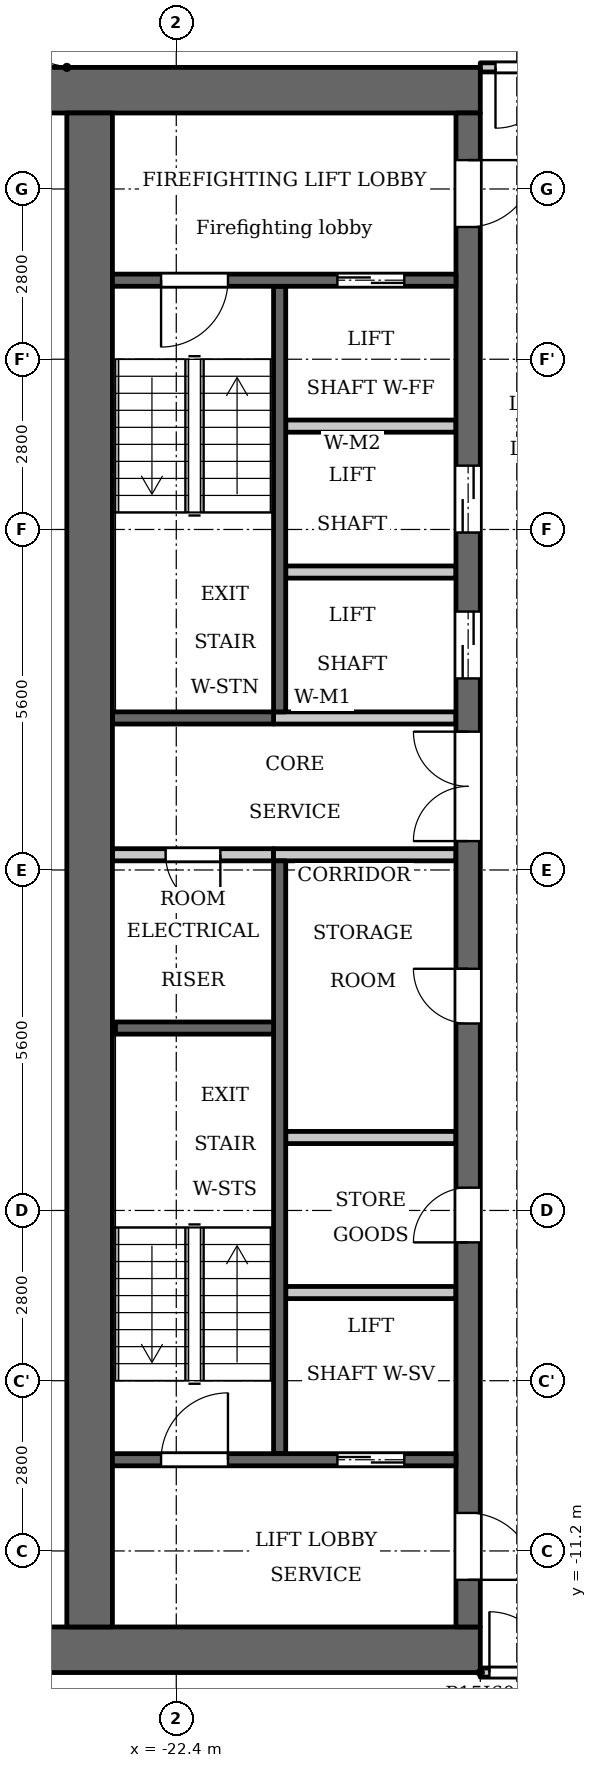
"""IFC4 building model, lengths in metres.
Left out: names, types, materials, properties, quantities, classifications, styles, units other than length and angle.
Written with IfcOpenShell. Run it as: python <this file> out.ifc"""

import sys

from ifc_helpers import new_model, si_unit, direction, frame, frame_2d, origin, place, context, subcontext, project, spatial, rectangle, extrude, element, fill, save


model = new_model("IFC4")
c1 = context("Model", 3, precision=1e-05, world=origin(), true_north=direction((0.0, 1.0)))
c2 = subcontext(c1, "Body", "Model", "MODEL_VIEW")
j1 = project(units=[si_unit("LENGTHUNIT", "METRE"), si_unit("PLANEANGLEUNIT", "RADIAN")], contexts=[c1])
p1 = place(None, origin())
s1 = spatial("IfcSite", under=j1, at=p1, CompositionType="ELEMENT")
p2 = place(p1, origin())
s2 = spatial("IfcBuilding", under=s1, at=p2, CompositionType="ELEMENT")
p3 = place(p2, frame((0.0, 0.0, 192.4)))
s3 = spatial("IfcBuildingStorey", under=s2, at=p3, CompositionType="ELEMENT", Elevation=192.4)
p4 = place(p3, frame((-20.7, 2.6, 0.0), z_axis=(0.0, 0.0, 1.0), x_axis=(0.0, 1.0, 0.0)))
e1 = element("IfcWall", 1, at=p4, inside=s3, PredefinedType="SHEAR", context=c2, shape_type="SweptSolid", body=[
    extrude(rectangle(XDim=7.0, YDim=0.2, at=frame_2d((3.5, 0.0))), origin(), (0.0, 0.0, 1.0), 3.2),
])
p5 = place(p3, frame((-20.7, -9.6, 0.0), z_axis=(0.0, 0.0, 1.0), x_axis=(0.0, 1.0, 0.0)))
e2 = element("IfcWall", 2, at=p5, inside=s3, PredefinedType="SHEAR", context=c2, shape_type="SweptSolid", body=[
    extrude(rectangle(XDim=9.75, YDim=0.2, at=frame_2d((4.875, 0.0))), origin(), (0.0, 0.0, 1.0), 3.2),
])
p6 = place(p3, frame((-20.8, 2.5, 0.0), z_axis=(0.0, 0.0, 1.0), x_axis=(-1.0, 0.0, 0.0)))
e3 = element("IfcWall", 3, at=p6, inside=s3, PredefinedType="SHEAR", context=c2, shape_type="SweptSolid", body=[
    extrude(rectangle(XDim=2.65, YDim=0.2, at=frame_2d((1.325, 0.0))), origin(), (0.0, 0.0, 1.0), 3.2),
])
p7 = place(p3, frame((-20.8, 0.25, 0.0), z_axis=(0.0, 0.0, 1.0), x_axis=(-1.0, 0.0, 0.0)))
e4 = element("IfcWall", 4, at=p7, inside=s3, PredefinedType="PARTITIONING", context=c2, shape_type="SweptSolid", body=[
    extrude(rectangle(XDim=2.65, YDim=0.2, at=frame_2d((1.325, 0.0))), origin(), (0.0, 0.0, 1.0), 3.2),
])
p8 = place(p7, frame((0.875, 0.0, 0.0)))
e5 = element("IfcOpeningElement", 5, at=p8, cuts=e4, PredefinedType="OPENING", context=c2, shape_type="SweptSolid", body=[
    extrude(rectangle(XDim=0.9, YDim=2.1, at=frame_2d((0.45, 1.05))), frame((0.0, 0.11, 0.0), z_axis=(0.0, -1.0, 0.0), x_axis=(1.0, 0.0, 0.0)), (0.0, 0.0, 1.0), 0.22),
])
for number, where, z_axis, x_axis in (
    (6, (-17.4, 12.825, 0.0), (0.0, 0.0, 1.0), (-1.0, 0.0, 0.0)),
    (7, (-17.4, -12.825, 0.0), (0.0, 0.0, 1.0), (-1.0, 0.0, 0.0)),
):
    element("IfcWall", number, at=place(p3, frame(where, z_axis=z_axis, x_axis=x_axis)), inside=s3, PredefinedType="SHEAR", context=c2, shape_type="SweptSolid", body=[
        extrude(rectangle(XDim=7.6, YDim=0.75, at=frame_2d((3.8, 0.0))), origin(), (0.0, 0.0, 1.0), 3.2),
    ])
p9 = place(p3, frame((-17.8, -4.4, 0.0), z_axis=(0.0, 0.0, 1.0), x_axis=(-1.0, 0.0, 0.0)))
e8 = element("IfcWall", 8, at=p9, inside=s3, PredefinedType="PARTITIONING", context=c2, shape_type="SweptSolid", body=[
    extrude(rectangle(XDim=2.8, YDim=0.2, at=frame_2d((1.4, 0.0))), origin(), (0.0, 0.0, 1.0), 3.2),
])
p10 = place(p3, frame((-17.6, -12.45, 0.0), z_axis=(0.0, 0.0, 1.0), x_axis=(0.0, 1.0, 0.0)))
e9 = element("IfcWall", 9, at=p10, inside=s3, PredefinedType="SHEAR", context=c2, shape_type="SweptSolid", body=[
    extrude(rectangle(XDim=24.9, YDim=0.4, at=frame_2d((12.45, 0.0))), origin(), (0.0, 0.0, 1.0), 3.2),
])
p11 = place(p10, frame((6.325, 0.0, 0.0)))
e10 = element("IfcOpeningElement", 10, at=p11, cuts=e9, PredefinedType="OPENING", context=c2, shape_type="SweptSolid", body=[
    extrude(rectangle(XDim=0.9, YDim=2.1, at=frame_2d((0.45, 1.05))), frame((0.0, 0.21, 0.0), z_axis=(0.0, -1.0, 0.0), x_axis=(1.0, 0.0, 0.0)), (0.0, 0.0, 1.0), 0.42),
])
p12 = place(p10, frame((9.925, 0.0, 0.0)))
e11 = element("IfcOpeningElement", 11, at=p12, cuts=e9, PredefinedType="OPENING", context=c2, shape_type="SweptSolid", body=[
    extrude(rectangle(XDim=0.9, YDim=2.1, at=frame_2d((0.45, 1.05))), frame((0.0, 0.21, 0.0), z_axis=(0.0, -1.0, 0.0), x_axis=(1.0, 0.0, 0.0)), (0.0, 0.0, 1.0), 0.42),
])
p13 = place(p10, frame((15.6, 0.0, 0.0)))
e12 = element("IfcOpeningElement", 12, at=p13, cuts=e9, PredefinedType="OPENING", context=c2, shape_type="SweptSolid", body=[
    extrude(rectangle(XDim=1.1, YDim=2.1, at=frame_2d((0.55, 1.05))), frame((0.0, 0.21, 0.0), z_axis=(0.0, -1.0, 0.0), x_axis=(1.0, 0.0, 0.0)), (0.0, 0.0, 1.0), 0.42),
])
p14 = place(p10, frame((18.0, 0.0, 0.0)))
e13 = element("IfcOpeningElement", 13, at=p14, cuts=e9, PredefinedType="OPENING", context=c2, shape_type="SweptSolid", body=[
    extrude(rectangle(XDim=1.1, YDim=2.1, at=frame_2d((0.55, 1.05))), frame((0.0, 0.21, 0.0), z_axis=(0.0, -1.0, 0.0), x_axis=(1.0, 0.0, 0.0)), (0.0, 0.0, 1.0), 0.42),
])
p15 = place(p10, frame((23.025, 0.0, 0.0)))
e14 = element("IfcOpeningElement", 14, at=p15, cuts=e9, PredefinedType="OPENING", context=c2, shape_type="SweptSolid", body=[
    extrude(rectangle(XDim=1.1, YDim=2.1, at=frame_2d((0.55, 1.05))), frame((0.0, 0.21, 0.0), z_axis=(0.0, -1.0, 0.0), x_axis=(1.0, 0.0, 0.0)), (0.0, 0.0, 1.0), 0.42),
])
p16 = place(p10, frame((0.775, 0.0, 0.0)))
e15 = element("IfcOpeningElement", 15, at=p16, cuts=e9, PredefinedType="OPENING", context=c2, shape_type="SweptSolid", body=[
    extrude(rectangle(XDim=1.1, YDim=2.1, at=frame_2d((0.55, 1.05))), frame((0.0, 0.21, 0.0), z_axis=(0.0, -1.0, 0.0), x_axis=(1.0, 0.0, 0.0)), (0.0, 0.0, 1.0), 0.42),
])
p17 = place(p10, frame((12.925, 0.0, 0.0)))
e16 = element("IfcOpeningElement", 16, at=p17, cuts=e9, PredefinedType="OPENING", context=c2, shape_type="SweptSolid", body=[
    extrude(rectangle(XDim=1.8, YDim=2.1, at=frame_2d((0.9, 1.05))), frame((0.0, 0.21, 0.0), z_axis=(0.0, -1.0, 0.0), x_axis=(1.0, 0.0, 0.0)), (0.0, 0.0, 1.0), 0.42),
])
p18 = place(p3, frame((-23.825, -12.45, 0.0), z_axis=(0.0, 0.0, 1.0), x_axis=(0.0, 1.0, 0.0)))
e17 = element("IfcWall", 17, at=p18, inside=s3, PredefinedType="SHEAR", context=c2, shape_type="SweptSolid", body=[
    extrude(rectangle(XDim=24.9, YDim=0.75, at=frame_2d((12.45, 0.0))), origin(), (0.0, 0.0, 1.0), 3.2),
])
p19 = place(p3, frame((-17.8, -9.7, 0.0), z_axis=(0.0, 0.0, 1.0), x_axis=(-1.0, 0.0, 0.0)))
e18 = element("IfcWall", 18, at=p19, inside=s3, PredefinedType="SHEAR", context=c2, shape_type="SweptSolid", body=[
    extrude(rectangle(XDim=5.65, YDim=0.2, at=frame_2d((2.825, 0.0))), origin(), (0.0, 0.0, 1.0), 3.2),
])
p20 = place(p19, frame((0.85, 0.0, 0.0)))
e19 = element("IfcOpeningElement", 19, at=p20, cuts=e18, PredefinedType="OPENING", context=c2, shape_type="SweptSolid", body=[
    extrude(rectangle(XDim=1.1, YDim=2.1, at=frame_2d((0.55, 1.05))), frame((0.0, 0.11, 0.0), z_axis=(0.0, -1.0, 0.0), x_axis=(1.0, 0.0, 0.0)), (0.0, 0.0, 1.0), 0.22),
])
p21 = place(p19, frame((3.75, 0.0, 0.0)))
e20 = element("IfcOpeningElement", 20, at=p21, cuts=e18, PredefinedType="OPENING", context=c2, shape_type="SweptSolid", body=[
    extrude(rectangle(XDim=1.1, YDim=2.1, at=frame_2d((0.55, 1.05))), frame((0.0, 0.11, 0.0), z_axis=(0.0, -1.0, 0.0), x_axis=(1.0, 0.0, 0.0)), (0.0, 0.0, 1.0), 0.22),
])
p22 = place(p3, frame((-17.8, -6.95, 0.0), z_axis=(0.0, 0.0, 1.0), x_axis=(-1.0, 0.0, 0.0)))
e21 = element("IfcWall", 21, at=p22, inside=s3, PredefinedType="PARTITIONING", context=c2, shape_type="SweptSolid", body=[
    extrude(rectangle(XDim=2.8, YDim=0.2, at=frame_2d((1.4, 0.0))), origin(), (0.0, 0.0, 1.0), 3.2),
])
for number, where, z_axis, x_axis in (
    (22, (-17.8, 0.25, 0.0), (0.0, 0.0, 1.0), (-1.0, 0.0, 0.0)),
    (23, (-17.8, 2.5, 0.0), (0.0, 0.0, 1.0), (-1.0, 0.0, 0.0)),
):
    element("IfcWall", number, at=place(p3, frame(where, z_axis=z_axis, x_axis=x_axis)), inside=s3, PredefinedType="PARTITIONING", context=c2, shape_type="SweptSolid", body=[
        extrude(rectangle(XDim=3.0, YDim=0.2, at=frame_2d((1.5, 0.0))), origin(), (0.0, 0.0, 1.0), 3.2),
    ])
for number, where, z_axis, x_axis in (
    (24, (-17.8, 4.9, 0.0), (0.0, 0.0, 1.0), (-1.0, 0.0, 0.0)),
    (25, (-17.8, 7.3, 0.0), (0.0, 0.0, 1.0), (-1.0, 0.0, 0.0)),
):
    element("IfcWall", number, at=place(p3, frame(where, z_axis=z_axis, x_axis=x_axis)), inside=s3, PredefinedType="PARTITIONING", context=c2, shape_type="SweptSolid", body=[
        extrude(rectangle(XDim=2.8, YDim=0.2, at=frame_2d((1.4, 0.0))), origin(), (0.0, 0.0, 1.0), 3.2),
    ])
p23 = place(p3, frame((-17.8, 9.7, 0.0), z_axis=(0.0, 0.0, 1.0), x_axis=(-1.0, 0.0, 0.0)))
e26 = element("IfcWall", 26, at=p23, inside=s3, PredefinedType="SHEAR", context=c2, shape_type="SweptSolid", body=[
    extrude(rectangle(XDim=5.65, YDim=0.2, at=frame_2d((2.825, 0.0))), origin(), (0.0, 0.0, 1.0), 3.2),
])
p24 = place(p23, frame((0.85, 0.0, 0.0)))
e27 = element("IfcOpeningElement", 27, at=p24, cuts=e26, PredefinedType="OPENING", context=c2, shape_type="SweptSolid", body=[
    extrude(rectangle(XDim=1.1, YDim=2.1, at=frame_2d((0.55, 1.05))), frame((0.0, 0.11, 0.0), z_axis=(0.0, -1.0, 0.0), x_axis=(1.0, 0.0, 0.0)), (0.0, 0.0, 1.0), 0.22),
])
p25 = place(p23, frame((3.75, 0.0, 0.0)))
e28 = element("IfcOpeningElement", 28, at=p25, cuts=e26, PredefinedType="OPENING", context=c2, shape_type="SweptSolid", body=[
    extrude(rectangle(XDim=1.1, YDim=2.1, at=frame_2d((0.55, 1.05))), frame((0.0, 0.11, 0.0), z_axis=(0.0, -1.0, 0.0), x_axis=(1.0, 0.0, 0.0)), (0.0, 0.0, 1.0), 0.22),
])
p26 = place(p3, frame((-20.8, -2.6, 0.0), z_axis=(0.0, 0.0, 1.0), x_axis=(-1.0, 0.0, 0.0)))
e29 = element("IfcWall", 29, at=p26, inside=s3, PredefinedType="SHEAR", context=c2, shape_type="SweptSolid", body=[
    extrude(rectangle(XDim=2.6, YDim=0.2, at=frame_2d((1.3, 0.0))), origin(), (0.0, 0.0, 1.0), 3.2),
])
p27 = place(p3, frame((-17.4, -13.2, 0.0), z_axis=(0.0, 0.0, 1.0), x_axis=(1.0, 0.0, 0.0)))
e30 = element("IfcWall", 30, at=p27, inside=s3, PredefinedType="PARTITIONING", context=c2, shape_type="SweptSolid", body=[
    extrude(rectangle(XDim=34.8, YDim=0.15, at=frame_2d((17.4, 0.0))), origin(), (0.0, 0.0, 1.0), 3.2),
])
p28 = place(p27, frame((0.15, 0.0, 0.0)))
e31 = element("IfcOpeningElement", 31, at=p28, cuts=e30, PredefinedType="OPENING", context=c2, shape_type="SweptSolid", body=[
    extrude(rectangle(XDim=1.0, YDim=2.1, at=frame_2d((0.5, 1.05))), frame((0.0, 0.085, 0.0), z_axis=(0.0, -1.0, 0.0), x_axis=(1.0, 0.0, 0.0)), (0.0, 0.0, 1.0), 0.17),
])
p29 = place(p27, frame((33.55, 0.0, 0.0)))
e32 = element("IfcOpeningElement", 32, at=p29, cuts=e30, PredefinedType="OPENING", context=c2, shape_type="SweptSolid", body=[
    extrude(rectangle(XDim=1.0, YDim=2.1, at=frame_2d((0.5, 1.05))), frame((0.0, 0.085, 0.0), z_axis=(0.0, -1.0, 0.0), x_axis=(1.0, 0.0, 0.0)), (0.0, 0.0, 1.0), 0.17),
])
p30 = place(p27, frame((15.7, 0.0, 0.0)))
e33 = element("IfcOpeningElement", 33, at=p30, cuts=e30, PredefinedType="OPENING", context=c2, shape_type="SweptSolid", body=[
    extrude(rectangle(XDim=1.0, YDim=2.1, at=frame_2d((0.5, 1.05))), frame((0.0, 0.085, 0.0), z_axis=(0.0, -1.0, 0.0), x_axis=(1.0, 0.0, 0.0)), (0.0, 0.0, 1.0), 0.17),
])
p31 = place(p27, frame((26.9, 0.0, 0.0)))
e34 = element("IfcOpeningElement", 34, at=p31, cuts=e30, PredefinedType="OPENING", context=c2, shape_type="SweptSolid", body=[
    extrude(rectangle(XDim=1.0, YDim=2.1, at=frame_2d((0.5, 1.05))), frame((0.0, 0.085, 0.0), z_axis=(0.0, -1.0, 0.0), x_axis=(1.0, 0.0, 0.0)), (0.0, 0.0, 1.0), 0.17),
])
p32 = place(p3, frame((-17.4, 13.2, 0.0), z_axis=(0.0, 0.0, 1.0), x_axis=(1.0, 0.0, 0.0)))
e35 = element("IfcWall", 35, at=p32, inside=s3, PredefinedType="PARTITIONING", context=c2, shape_type="SweptSolid", body=[
    extrude(rectangle(XDim=34.8, YDim=0.15, at=frame_2d((17.4, 0.0))), origin(), (0.0, 0.0, 1.0), 3.2),
])
p33 = place(p32, frame((0.25, 0.0, 0.0)))
e36 = element("IfcOpeningElement", 36, at=p33, cuts=e35, PredefinedType="OPENING", context=c2, shape_type="SweptSolid", body=[
    extrude(rectangle(XDim=1.0, YDim=2.1, at=frame_2d((0.5, 1.05))), frame((0.0, 0.085, 0.0), z_axis=(0.0, -1.0, 0.0), x_axis=(1.0, 0.0, 0.0)), (0.0, 0.0, 1.0), 0.17),
])
p34 = place(p32, frame((33.65, 0.0, 0.0)))
e37 = element("IfcOpeningElement", 37, at=p34, cuts=e35, PredefinedType="OPENING", context=c2, shape_type="SweptSolid", body=[
    extrude(rectangle(XDim=1.0, YDim=2.1, at=frame_2d((0.5, 1.05))), frame((0.0, 0.085, 0.0), z_axis=(0.0, -1.0, 0.0), x_axis=(1.0, 0.0, 0.0)), (0.0, 0.0, 1.0), 0.17),
])
p35 = place(p32, frame((10.15, 0.0, 0.0)))
e38 = element("IfcOpeningElement", 38, at=p35, cuts=e35, PredefinedType="OPENING", context=c2, shape_type="SweptSolid", body=[
    extrude(rectangle(XDim=1.0, YDim=2.1, at=frame_2d((0.5, 1.05))), frame((0.0, 0.085, 0.0), z_axis=(0.0, -1.0, 0.0), x_axis=(1.0, 0.0, 0.0)), (0.0, 0.0, 1.0), 0.17),
])
p36 = place(p32, frame((13.55, 0.0, 0.0)))
e39 = element("IfcOpeningElement", 39, at=p36, cuts=e35, PredefinedType="OPENING", context=c2, shape_type="SweptSolid", body=[
    extrude(rectangle(XDim=1.0, YDim=2.1, at=frame_2d((0.5, 1.05))), frame((0.0, 0.085, 0.0), z_axis=(0.0, -1.0, 0.0), x_axis=(1.0, 0.0, 0.0)), (0.0, 0.0, 1.0), 0.17),
])
p37 = place(p32, frame((20.85, 0.0, 0.0)))
e40 = element("IfcOpeningElement", 40, at=p37, cuts=e35, PredefinedType="OPENING", context=c2, shape_type="SweptSolid", body=[
    extrude(rectangle(XDim=1.0, YDim=2.1, at=frame_2d((0.5, 1.05))), frame((0.0, 0.085, 0.0), z_axis=(0.0, -1.0, 0.0), x_axis=(1.0, 0.0, 0.0)), (0.0, 0.0, 1.0), 0.17),
])
p38 = place(p32, frame((23.7, 0.0, 0.0)))
e41 = element("IfcOpeningElement", 41, at=p38, cuts=e35, PredefinedType="OPENING", context=c2, shape_type="SweptSolid", body=[
    extrude(rectangle(XDim=1.0, YDim=2.1, at=frame_2d((0.5, 1.05))), frame((0.0, 0.085, 0.0), z_axis=(0.0, -1.0, 0.0), x_axis=(1.0, 0.0, 0.0)), (0.0, 0.0, 1.0), 0.17),
])
p39 = place(p20, origin())
e42 = element("IfcDoor", 42, at=p39, inside=s3, OperationType="DOUBLE_DOOR_SLIDING", PredefinedType="DOOR", context=c2, shape_type="SweptSolid", body=[
    extrude(rectangle(XDim=1.1, YDim=2.1, at=frame_2d((0.55, 1.05))), frame((0.0, 0.025, 0.0), z_axis=(0.0, -1.0, 0.0), x_axis=(1.0, 0.0, 0.0)), (0.0, 0.0, 1.0), 0.05),
])
fill(e19, e42)
p40 = place(p11, origin())
e43 = element("IfcDoor", 43, at=p40, inside=s3, OperationType="SINGLE_SWING_RIGHT", PredefinedType="DOOR", context=c2, shape_type="SweptSolid", body=[
    extrude(rectangle(XDim=0.9, YDim=2.1, at=frame_2d((0.45, 1.05))), frame((0.0, 0.025, 0.0), z_axis=(0.0, -1.0, 0.0), x_axis=(1.0, 0.0, 0.0)), (0.0, 0.0, 1.0), 0.05),
])
fill(e10, e43)
p41 = place(p12, origin())
e44 = element("IfcDoor", 44, at=p41, inside=s3, OperationType="SINGLE_SWING_LEFT", PredefinedType="DOOR", context=c2, shape_type="SweptSolid", body=[
    extrude(rectangle(XDim=0.9, YDim=2.1, at=frame_2d((0.45, 1.05))), frame((0.0, 0.025, 0.0), z_axis=(0.0, -1.0, 0.0), x_axis=(1.0, 0.0, 0.0)), (0.0, 0.0, 1.0), 0.05),
])
fill(e11, e44)
p42 = place(p13, origin())
e45 = element("IfcDoor", 45, at=p42, inside=s3, OperationType="DOUBLE_DOOR_SLIDING", PredefinedType="DOOR", context=c2, shape_type="SweptSolid", body=[
    extrude(rectangle(XDim=1.1, YDim=2.1, at=frame_2d((0.55, 1.05))), frame((0.0, 0.025, 0.0), z_axis=(0.0, -1.0, 0.0), x_axis=(1.0, 0.0, 0.0)), (0.0, 0.0, 1.0), 0.05),
])
fill(e12, e45)
p43 = place(p14, origin())
e46 = element("IfcDoor", 46, at=p43, inside=s3, OperationType="DOUBLE_DOOR_SLIDING", PredefinedType="DOOR", context=c2, shape_type="SweptSolid", body=[
    extrude(rectangle(XDim=1.1, YDim=2.1, at=frame_2d((0.55, 1.05))), frame((0.0, 0.025, 0.0), z_axis=(0.0, -1.0, 0.0), x_axis=(1.0, 0.0, 0.0)), (0.0, 0.0, 1.0), 0.05),
])
fill(e13, e46)
p44 = place(p24, origin())
e47 = element("IfcDoor", 47, at=p44, inside=s3, OperationType="DOUBLE_DOOR_SLIDING", PredefinedType="DOOR", context=c2, shape_type="SweptSolid", body=[
    extrude(rectangle(XDim=1.1, YDim=2.1, at=frame_2d((0.55, 1.05))), frame((0.0, 0.025, 0.0), z_axis=(0.0, -1.0, 0.0), x_axis=(1.0, 0.0, 0.0)), (0.0, 0.0, 1.0), 0.05),
])
fill(e27, e47)
p45 = place(p15, origin())
e48 = element("IfcDoor", 48, at=p45, inside=s3, OperationType="SINGLE_SWING_RIGHT", PredefinedType="DOOR", context=c2, shape_type="SweptSolid", body=[
    extrude(rectangle(XDim=1.1, YDim=2.1, at=frame_2d((0.55, 1.05))), frame((0.0, 0.025, 0.0), z_axis=(0.0, -1.0, 0.0), x_axis=(1.0, 0.0, 0.0)), (0.0, 0.0, 1.0), 0.05),
])
fill(e14, e48)
p46 = place(p16, origin())
e49 = element("IfcDoor", 49, at=p46, inside=s3, OperationType="SINGLE_SWING_LEFT", PredefinedType="DOOR", context=c2, shape_type="SweptSolid", body=[
    extrude(rectangle(XDim=1.1, YDim=2.1, at=frame_2d((0.55, 1.05))), frame((0.0, 0.025, 0.0), z_axis=(0.0, -1.0, 0.0), x_axis=(1.0, 0.0, 0.0)), (0.0, 0.0, 1.0), 0.05),
])
fill(e15, e49)
p47 = place(p25, origin())
e50 = element("IfcDoor", 50, at=p47, inside=s3, OperationType="SINGLE_SWING_LEFT", PredefinedType="DOOR", context=c2, shape_type="SweptSolid", body=[
    extrude(rectangle(XDim=1.1, YDim=2.1, at=frame_2d((0.55, 1.05))), frame((0.0, 0.025, 0.0), z_axis=(0.0, -1.0, 0.0), x_axis=(1.0, 0.0, 0.0)), (0.0, 0.0, 1.0), 0.05),
])
fill(e28, e50)
p48 = place(p21, origin())
e51 = element("IfcDoor", 51, at=p48, inside=s3, OperationType="SINGLE_SWING_LEFT", PredefinedType="DOOR", context=c2, shape_type="SweptSolid", body=[
    extrude(rectangle(XDim=1.1, YDim=2.1, at=frame_2d((0.55, 1.05))), frame((0.0, 0.025, 0.0), z_axis=(0.0, -1.0, 0.0), x_axis=(1.0, 0.0, 0.0)), (0.0, 0.0, 1.0), 0.05),
])
fill(e20, e51)
p49 = place(p17, origin())
e52 = element("IfcDoor", 52, at=p49, inside=s3, OperationType="DOUBLE_DOOR_SINGLE_SWING", PredefinedType="DOOR", context=c2, shape_type="SweptSolid", body=[
    extrude(rectangle(XDim=1.8, YDim=2.1, at=frame_2d((0.9, 1.05))), frame((0.0, 0.025, 0.0), z_axis=(0.0, -1.0, 0.0), x_axis=(1.0, 0.0, 0.0)), (0.0, 0.0, 1.0), 0.05),
])
fill(e16, e52)
p50 = place(p8, origin())
e53 = element("IfcDoor", 53, at=p50, inside=s3, OperationType="SINGLE_SWING_RIGHT", PredefinedType="DOOR", context=c2, shape_type="SweptSolid", body=[
    extrude(rectangle(XDim=0.9, YDim=2.1, at=frame_2d((0.45, 1.05))), frame((0.0, 0.025, 0.0), z_axis=(0.0, -1.0, 0.0), x_axis=(1.0, 0.0, 0.0)), (0.0, 0.0, 1.0), 0.05),
])
fill(e5, e53)
p51 = place(p33, origin())
e54 = element("IfcDoor", 54, at=p51, inside=s3, OperationType="SINGLE_SWING_LEFT", PredefinedType="DOOR", context=c2, shape_type="SweptSolid", body=[
    extrude(rectangle(XDim=1.0, YDim=2.1, at=frame_2d((0.5, 1.05))), frame((0.0, 0.025, 0.0), z_axis=(0.0, -1.0, 0.0), x_axis=(1.0, 0.0, 0.0)), (0.0, 0.0, 1.0), 0.05),
])
fill(e36, e54)
p52 = place(p28, origin())
e55 = element("IfcDoor", 55, at=p52, inside=s3, OperationType="SINGLE_SWING_RIGHT", PredefinedType="DOOR", context=c2, shape_type="SweptSolid", body=[
    extrude(rectangle(XDim=1.0, YDim=2.1, at=frame_2d((0.5, 1.05))), frame((0.0, 0.025, 0.0), z_axis=(0.0, -1.0, 0.0), x_axis=(1.0, 0.0, 0.0)), (0.0, 0.0, 1.0), 0.05),
])
fill(e31, e55)
save(model, sys.argv[1])
